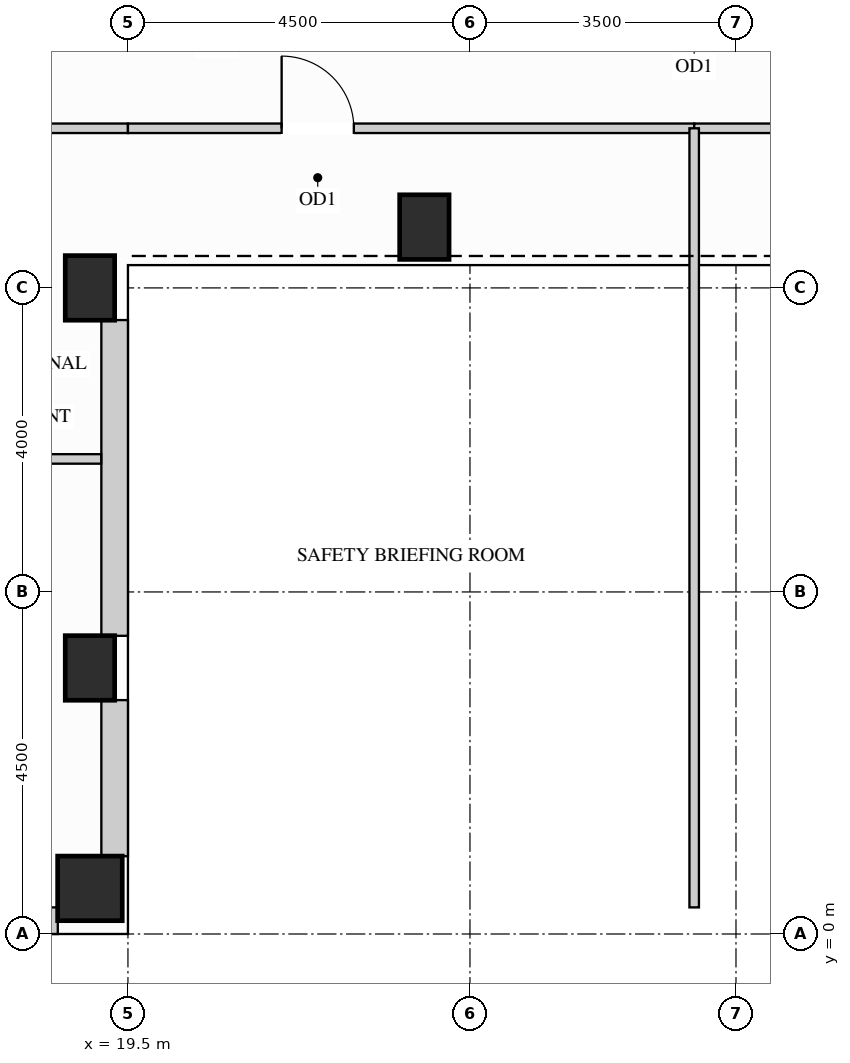
"""IFC4 building model, lengths in metres.
Left out: names, types, materials, properties, quantities, classifications, styles, units other than length and angle.
Written with IfcOpenShell. Run it as: python <this file> out.ifc"""

import sys

from ifc_helpers import new_model, si_unit, direction, frame, frame_2d, origin, origin_2d, place, context, subcontext, project, spatial, rectangle, extrude, source, transform, mapped, element, fill, save


model = new_model("IFC4")
c1 = context("Model", 3, precision=1e-05, world=origin(), true_north=direction((0.0, 1.0)))
c2 = subcontext(c1, "Body", "Model", "MODEL_VIEW")
j1 = project(units=[si_unit("LENGTHUNIT", "METRE"), si_unit("PLANEANGLEUNIT", "RADIAN")], contexts=[c1])
p1 = place(None, origin())
s1 = spatial("IfcSite", under=j1, at=p1, CompositionType="ELEMENT")
p2 = place(p1, origin())
s2 = spatial("IfcBuilding", under=s1, at=p2, CompositionType="ELEMENT")
p3 = place(p2, frame((0.0, 0.0, 248.4)))
s3 = spatial("IfcBuildingStorey", under=s2, at=p3, CompositionType="ELEMENT", Elevation=248.4)
m1 = source(origin(), c2, "Body", "SweptSolid", [
    extrude(rectangle(XDim=0.65, YDim=0.85, at=origin_2d()), origin(), (0.0, 0.0, 1.0), 3.4),
])
for number, where, z_axis, x_axis in (
    (1, (19.0, 3.5, 0.0), (0.0, 0.0, 1.0), (1.0, 0.0, 0.0)),
    (2, (19.0, 8.5, 0.0), (0.0, 0.0, 1.0), (1.0, 0.0, 0.0)),
    (3, (23.4, 9.3, 0.0), (0.0, 0.0, 1.0), (1.0, 0.0, 0.0)),
):
    element("IfcColumn", number, at=place(p3, frame(where, z_axis=z_axis, x_axis=x_axis)), inside=s3, PredefinedType="COLUMN", context=c2, shape_type="MappedRepresentation", body=[
        mapped(m1, transform((0.0, 0.0, 0.0), x_axis=(1.0, 0.0, 0.0), y_axis=(0.0, 1.0, 0.0), z_axis=(0.0, 0.0, 1.0))),
    ])
m2 = source(origin(), c2, "Body", "SweptSolid", [
    extrude(rectangle(XDim=0.85, YDim=0.85, at=origin_2d()), origin(), (0.0, 0.0, 1.0), 3.4),
])
p4 = place(p3, frame((19.0, 0.6, 0.0), z_axis=(0.0, 0.0, 1.0), x_axis=(1.0, 0.0, 0.0)))
e4 = element("IfcColumn", 4, at=p4, inside=s3, PredefinedType="COLUMN", context=c2, shape_type="MappedRepresentation", body=[
    mapped(m2, transform((0.0, 0.0, 0.0), x_axis=(1.0, 0.0, 0.0), y_axis=(0.0, 1.0, 0.0), z_axis=(0.0, 0.0, 1.0))),
])
p5 = place(p3, frame((14.923, 0.175, 0.0), z_axis=(0.0, 0.0, 1.0), x_axis=(1.0, 0.0, 0.0)))
e5 = element("IfcWall", 5, at=p5, inside=s3, PredefinedType="SOLIDWALL", context=c2, shape_type="SweptSolid", body=[
    extrude(rectangle(XDim=3.654, YDim=0.35, at=frame_2d((1.827, 0.0))), origin(), (0.0, 0.0, 1.0), 3.385),
])
p6 = place(p5, frame((0.777, 0.0, 0.78)))
e6 = element("IfcOpeningElement", 6, at=p6, cuts=e5, PredefinedType="OPENING", context=c2, shape_type="SweptSolid", body=[
    extrude(rectangle(XDim=2.1, YDim=2.25, at=frame_2d((1.05, 1.125))), frame((0.0, 0.185, 0.0), z_axis=(0.0, -1.0, 0.0), x_axis=(1.0, 0.0, 0.0)), (0.0, 0.0, 1.0), 0.37),
])
m3 = source(origin(), c2, "Body", "SweptSolid", [
    extrude(rectangle(XDim=2.054, YDim=0.35, at=frame_2d((1.027, 0.0))), origin(), (0.0, 0.0, 1.0), 2.619),
])
p7 = place(p3, frame((19.325, 1.023, 0.0), z_axis=(0.0, 0.0, 1.0), x_axis=(0.0, 1.0, 0.0)))
e7 = element("IfcWall", 7, at=p7, inside=s3, PredefinedType="SOLIDWALL", context=c2, shape_type="MappedRepresentation", body=[
    mapped(m3, transform((0.0, 0.0, 0.0), x_axis=(1.0, 0.0, 0.0), y_axis=(0.0, 1.0, 0.0), z_axis=(0.0, 0.0, 1.0))),
])
m4 = source(origin(), c2, "Body", "SweptSolid", [
    extrude(rectangle(XDim=4.154, YDim=0.35, at=frame_2d((2.077, 0.0))), origin(), (0.0, 0.0, 1.0), 2.619),
])
p8 = place(p3, frame((19.325, 3.923, 0.0), z_axis=(0.0, 0.0, 1.0), x_axis=(0.0, 1.0, 0.0)))
e8 = element("IfcWall", 8, at=p8, inside=s3, PredefinedType="SOLIDWALL", context=c2, shape_type="MappedRepresentation", body=[
    mapped(m4, transform((0.0, 0.0, 0.0), x_axis=(1.0, 0.0, 0.0), y_axis=(0.0, 1.0, 0.0), z_axis=(0.0, 0.0, 1.0))),
])
m5 = source(origin(), c2, "Body", "SweptSolid", [
    extrude(rectangle(XDim=2.95, YDim=0.125, at=frame_2d((1.475, 0.0))), origin(), (0.0, 0.0, 1.0), 3.385),
])
p9 = place(p3, frame((16.55, 10.6, 0.0), z_axis=(0.0, 0.0, 1.0), x_axis=(1.0, 0.0, 0.0)))
e9 = element("IfcWall", 9, at=p9, inside=s3, PredefinedType="PARTITIONING", context=c2, shape_type="MappedRepresentation", body=[
    mapped(m5, transform((0.0, 0.0, 0.0), x_axis=(1.0, 0.0, 0.0), y_axis=(0.0, 1.0, 0.0), z_axis=(0.0, 0.0, 1.0))),
])
p10 = place(p3, frame((19.5, 10.6, 0.0), z_axis=(0.0, 0.0, 1.0), x_axis=(1.0, 0.0, 0.0)))
e10 = element("IfcWall", 10, at=p10, inside=s3, PredefinedType="PARTITIONING", context=c2, shape_type="SweptSolid", body=[
    extrude(rectangle(XDim=7.45, YDim=0.125, at=frame_2d((3.725, 0.0))), origin(), (0.0, 0.0, 1.0), 3.385),
])
p11 = place(p10, frame((2.022, 0.0, 0.0)))
e11 = element("IfcOpeningElement", 11, at=p11, cuts=e10, PredefinedType="OPENING", context=c2, shape_type="SweptSolid", body=[
    extrude(rectangle(XDim=0.95, YDim=2.15, at=frame_2d((0.475, 1.075))), frame((0.0, 0.073, 0.0), z_axis=(0.0, -1.0, 0.0), x_axis=(1.0, 0.0, 0.0)), (0.0, 0.0, 1.0), 0.145),
])
p12 = place(p3, frame((26.95, 10.6, 0.0), z_axis=(0.0, 0.0, 1.0), x_axis=(1.0, 0.0, 0.0)))
e12 = element("IfcWall", 12, at=p12, inside=s3, PredefinedType="PARTITIONING", context=c2, shape_type="SweptSolid", body=[
    extrude(rectangle(XDim=7.45, YDim=0.125, at=frame_2d((3.725, 0.0))), origin(), (0.0, 0.0, 1.0), 3.385),
])
p13 = place(p12, frame((4.478, 0.0, 0.0)))
e13 = element("IfcOpeningElement", 13, at=p13, cuts=e12, PredefinedType="OPENING", context=c2, shape_type="SweptSolid", body=[
    extrude(rectangle(XDim=0.95, YDim=2.15, at=frame_2d((0.475, 1.075))), frame((0.0, 0.073, 0.0), z_axis=(0.0, -1.0, 0.0), x_axis=(1.0, 0.0, 0.0)), (0.0, 0.0, 1.0), 0.145),
])
m6 = source(origin(), c2, "Body", "SweptSolid", [
    extrude(rectangle(XDim=10.25, YDim=0.125, at=frame_2d((5.125, 0.0))), origin(), (0.0, 0.0, 1.0), 3.385),
])
p14 = place(p3, frame((26.95, 0.35, 0.0), z_axis=(0.0, 0.0, 1.0), x_axis=(0.0, 1.0, 0.0)))
e14 = element("IfcWall", 14, at=p14, inside=s3, PredefinedType="PARTITIONING", context=c2, shape_type="MappedRepresentation", body=[
    mapped(m6, transform((0.0, 0.0, 0.0), x_axis=(1.0, 0.0, 0.0), y_axis=(0.0, 1.0, 0.0), z_axis=(0.0, 0.0, 1.0))),
])
m7 = source(origin(), c2, "Body", "SweptSolid", [
    extrude(rectangle(XDim=2.598, YDim=0.125, at=frame_2d((1.299, 0.0))), origin(), (0.0, 0.0, 1.0), 2.848),
])
p15 = place(p3, frame((16.55, 6.25, 0.0), z_axis=(0.0, 0.0, 1.0), x_axis=(1.0, 0.0, 0.0)))
e15 = element("IfcWall", 15, at=p15, inside=s3, PredefinedType="PARTITIONING", context=c2, shape_type="MappedRepresentation", body=[
    mapped(m7, transform((0.0, 0.0, 0.0), x_axis=(1.0, 0.0, 0.0), y_axis=(0.0, 1.0, 0.0), z_axis=(0.0, 0.0, 1.0))),
])
m8 = source(origin(), c2, "Body", "SweptSolid", [
    extrude(rectangle(XDim=0.95, YDim=2.15, at=frame_2d((0.475, 1.075))), frame((0.0, 0.025, 0.0), z_axis=(0.0, -1.0, 0.0), x_axis=(1.0, 0.0, 0.0)), (0.0, 0.0, 1.0), 0.05),
])
p16 = place(p11, origin())
e16 = element("IfcDoor", 16, at=p16, inside=s3, OperationType="SINGLE_SWING_LEFT", PredefinedType="DOOR", context=c2, shape_type="MappedRepresentation", body=[
    mapped(m8, transform((0.0, 0.0, 0.0), x_axis=(1.0, 0.0, 0.0), y_axis=(0.0, 1.0, 0.0), z_axis=(0.0, 0.0, 1.0))),
])
fill(e11, e16)
save(model, sys.argv[1])
